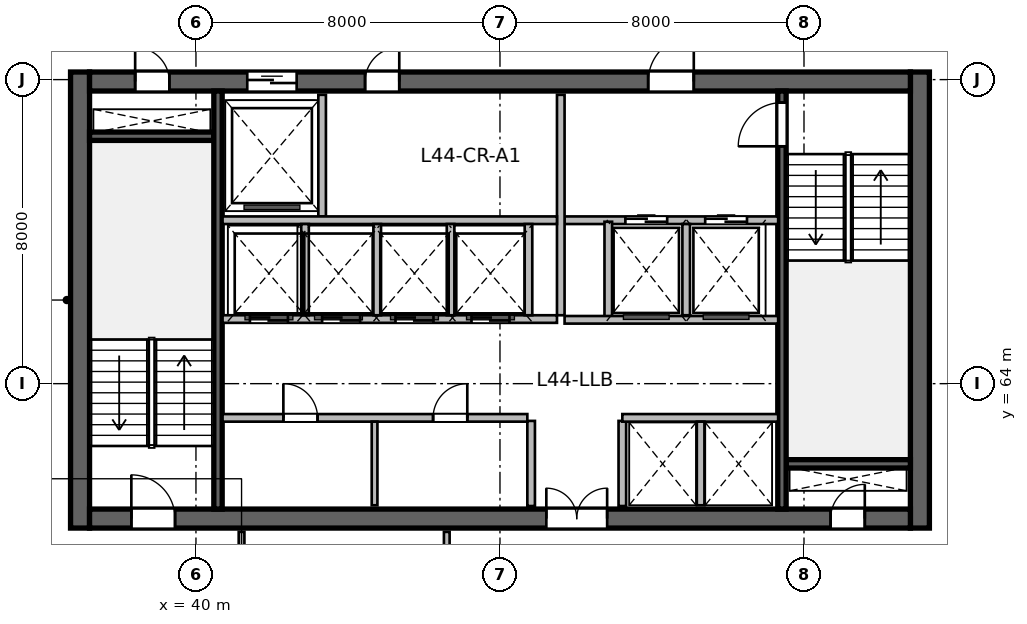
"""IFC4 building model, lengths in metres.
Left out: names, types, materials, properties, quantities, classifications, styles, units other than length and angle.
Written with IfcOpenShell. Run it as: python <this file> out.ifc"""

import sys

from ifc_helpers import new_model, si_unit, direction, frame, frame_2d, origin, place, context, subcontext, project, spatial, rectangle, extrude, source, transform, mapped, element, fill, save


model = new_model("IFC4")
c1 = context("Model", 3, precision=1e-05, world=origin(), true_north=direction((0.0, 1.0)))
c2 = subcontext(c1, "Body", "Model", "MODEL_VIEW")
j1 = project(units=[si_unit("LENGTHUNIT", "METRE"), si_unit("PLANEANGLEUNIT", "RADIAN")], contexts=[c1])
p1 = place(None, origin())
s1 = spatial("IfcSite", under=j1, at=p1, CompositionType="ELEMENT")
p2 = place(p1, origin())
s2 = spatial("IfcBuilding", under=s1, at=p2, CompositionType="ELEMENT")
p3 = place(p2, frame((0.0, 0.0, 181.8)))
s3 = spatial("IfcBuildingStorey", under=s2, at=p3, CompositionType="ELEMENT", Elevation=181.8)
m1 = source(origin(), c2, "Body", "SweptSolid", [
    extrude(rectangle(XDim=12.0, YDim=0.5, at=frame_2d((6.0, 0.0))), origin(), (0.0, 0.0, 1.0), 3.9),
])
for number, where, z_axis, x_axis in (
    (1, (36.95, 60.2, 0.0), (0.0, 0.0, 1.0), (0.0, 1.0, 0.0)),
    (2, (59.05, 60.2, 0.0), (0.0, 0.0, 1.0), (0.0, 1.0, 0.0)),
):
    element("IfcWall", number, at=place(p3, frame(where, z_axis=z_axis, x_axis=x_axis)), inside=s3, PredefinedType="SHEAR", context=c2, shape_type="MappedRepresentation", body=[
        mapped(m1, transform((0.0, 0.0, 0.0), scale=1.0)),
    ])
m2 = source(origin(), c2, "Body", "SweptSolid", [
    extrude(rectangle(XDim=21.6, YDim=0.5, at=frame_2d((10.8, 0.0))), origin(), (0.0, 0.0, 1.0), 3.9),
])
p4 = place(p3, frame((37.2, 60.45, 0.0), z_axis=(0.0, 0.0, 1.0), x_axis=(1.0, 0.0, 0.0)))
e3 = element("IfcWall", 3, at=p4, inside=s3, PredefinedType="SHEAR", context=c2, shape_type="MappedRepresentation", body=[
    mapped(m2, transform((0.0, 0.0, 0.0), scale=1.0)),
])
p5 = place(p4, frame((1.1, 0.0, 0.0)))
e4 = element("IfcOpeningElement", 4, at=p5, cuts=e3, PredefinedType="OPENING", context=c2, shape_type="SweptSolid", body=[
    extrude(rectangle(XDim=1.15, YDim=2.15, at=frame_2d((0.575, 1.075))), frame((0.0, 0.26, 0.0), z_axis=(0.0, -1.0, 0.0), x_axis=(1.0, 0.0, 0.0)), (0.0, 0.0, 1.0), 0.52),
])
p6 = place(p4, frame((19.5, 0.0, 0.0)))
e5 = element("IfcOpeningElement", 5, at=p6, cuts=e3, PredefinedType="OPENING", context=c2, shape_type="SweptSolid", body=[
    extrude(rectangle(XDim=0.9, YDim=2.1, at=frame_2d((0.45, 1.05))), frame((0.0, 0.26, 0.0), z_axis=(0.0, -1.0, 0.0), x_axis=(1.0, 0.0, 0.0)), (0.0, 0.0, 1.0), 0.52),
])
p7 = place(p4, frame((12.02, 0.0, 0.0)))
e6 = element("IfcOpeningElement", 6, at=p7, cuts=e3, PredefinedType="OPENING", context=c2, shape_type="SweptSolid", body=[
    extrude(rectangle(XDim=1.6, YDim=2.15, at=frame_2d((0.8, 1.075))), frame((0.0, 0.26, 0.0), z_axis=(0.0, -1.0, 0.0), x_axis=(1.0, 0.0, 0.0)), (0.0, 0.0, 1.0), 0.52),
])
p8 = place(p3, frame((37.2, 71.95, 0.0), z_axis=(0.0, 0.0, 1.0), x_axis=(1.0, 0.0, 0.0)))
e7 = element("IfcWall", 7, at=p8, inside=s3, PredefinedType="SHEAR", context=c2, shape_type="MappedRepresentation", body=[
    mapped(m2, transform((0.0, 0.0, 0.0), scale=1.0)),
])
p9 = place(p8, frame((1.2, 0.0, 0.0)))
e8 = element("IfcOpeningElement", 8, at=p9, cuts=e7, PredefinedType="OPENING", context=c2, shape_type="SweptSolid", body=[
    extrude(rectangle(XDim=0.9, YDim=2.1, at=frame_2d((0.45, 1.05))), frame((0.0, 0.26, 0.0), z_axis=(0.0, -1.0, 0.0), x_axis=(1.0, 0.0, 0.0)), (0.0, 0.0, 1.0), 0.52),
])
p10 = place(p8, frame((14.7, 0.0, 0.0)))
e9 = element("IfcOpeningElement", 9, at=p10, cuts=e7, PredefinedType="OPENING", context=c2, shape_type="SweptSolid", body=[
    extrude(rectangle(XDim=1.2, YDim=2.15, at=frame_2d((0.6, 1.075))), frame((0.0, 0.26, 0.0), z_axis=(0.0, -1.0, 0.0), x_axis=(1.0, 0.0, 0.0)), (0.0, 0.0, 1.0), 0.52),
])
p11 = place(p8, frame((4.15, 0.0, 0.0)))
e10 = element("IfcOpeningElement", 10, at=p11, cuts=e7, PredefinedType="OPENING", context=c2, shape_type="SweptSolid", body=[
    extrude(rectangle(XDim=1.3, YDim=2.15, at=frame_2d((0.65, 1.075))), frame((0.0, 0.26, 0.0), z_axis=(0.0, -1.0, 0.0), x_axis=(1.0, 0.0, 0.0)), (0.0, 0.0, 1.0), 0.52),
])
p12 = place(p8, frame((7.25, 0.0, 0.0)))
e11 = element("IfcOpeningElement", 11, at=p12, cuts=e7, PredefinedType="OPENING", context=c2, shape_type="SweptSolid", body=[
    extrude(rectangle(XDim=0.9, YDim=2.1, at=frame_2d((0.45, 1.05))), frame((0.0, 0.26, 0.0), z_axis=(0.0, -1.0, 0.0), x_axis=(1.0, 0.0, 0.0)), (0.0, 0.0, 1.0), 0.52),
])
m3 = source(origin(), c2, "Body", "SweptSolid", [
    extrude(rectangle(XDim=3.27, YDim=0.22, at=frame_2d((1.635, 0.0))), origin(), (0.0, 0.0, 1.0), 3.9),
])
for number, where, z_axis, x_axis in (
    (12, (37.2, 70.51, 0.0), (0.0, 0.0, 1.0), (1.0, 0.0, 0.0)),
    (13, (55.53, 61.89, 0.0), (0.0, 0.0, 1.0), (1.0, 0.0, 0.0)),
):
    element("IfcWall", number, at=place(p3, frame(where, z_axis=z_axis, x_axis=x_axis)), inside=s3, PredefinedType="SHEAR", context=c2, shape_type="MappedRepresentation", body=[
        mapped(m3, transform((0.0, 0.0, 0.0), scale=1.0)),
    ])
m4 = source(origin(), c2, "Body", "SweptSolid", [
    extrude(rectangle(XDim=11.0, YDim=0.22, at=frame_2d((5.5, 0.0))), origin(), (0.0, 0.0, 1.0), 3.9),
])
p13 = place(p3, frame((40.58, 60.7, 0.0), z_axis=(0.0, 0.0, 1.0), x_axis=(0.0, 1.0, 0.0)))
e14 = element("IfcWall", 14, at=p13, inside=s3, PredefinedType="SHEAR", context=c2, shape_type="MappedRepresentation", body=[
    mapped(m4, transform((0.0, 0.0, 0.0), scale=1.0)),
])
p14 = place(p3, frame((55.42, 60.7, 0.0), z_axis=(0.0, 0.0, 1.0), x_axis=(0.0, 1.0, 0.0)))
e15 = element("IfcWall", 15, at=p14, inside=s3, PredefinedType="SHEAR", context=c2, shape_type="MappedRepresentation", body=[
    mapped(m4, transform((0.0, 0.0, 0.0), scale=1.0)),
])
p15 = place(p14, frame((9.545, 0.0, 0.0)))
e16 = element("IfcOpeningElement", 16, at=p15, cuts=e15, PredefinedType="OPENING", context=c2, shape_type="SweptSolid", body=[
    extrude(rectangle(XDim=1.15, YDim=2.15, at=frame_2d((0.575, 1.075))), frame((0.0, 0.12, 0.0), z_axis=(0.0, -1.0, 0.0), x_axis=(1.0, 0.0, 0.0)), (0.0, 0.0, 1.0), 0.24),
])
m5 = source(origin(), c2, "Body", "SweptSolid", [
    extrude(rectangle(XDim=2.24, YDim=0.2, at=frame_2d((1.12, 0.0))), origin(), (0.0, 0.0, 1.0), 3.65),
])
for number, where, z_axis, x_axis in (
    (17, (48.82, 60.78, 0.0), (0.0, 0.0, 1.0), (0.0, 1.0, 0.0)),
    (18, (51.22, 60.78, 0.0), (0.0, 0.0, 1.0), (0.0, 1.0, 0.0)),
):
    element("IfcWall", number, at=place(p3, frame(where, z_axis=z_axis, x_axis=x_axis)), inside=s3, PredefinedType="SOLIDWALL", context=c2, shape_type="MappedRepresentation", body=[
        mapped(m5, transform((0.0, 0.0, 0.0), scale=1.0)),
    ])
m6 = source(origin(), c2, "Body", "SweptSolid", [
    extrude(rectangle(XDim=5.62, YDim=0.2, at=frame_2d((2.81, 0.0))), origin(), (0.0, 0.0, 1.0), 3.65),
])
p16 = place(p3, frame((49.7, 68.3, 0.0), z_axis=(0.0, 0.0, 1.0), x_axis=(1.0, 0.0, 0.0)))
e19 = element("IfcWall", 19, at=p16, inside=s3, PredefinedType="SOLIDWALL", context=c2, shape_type="MappedRepresentation", body=[
    mapped(m6, transform((0.0, 0.0, 0.0), scale=1.0)),
])
p17 = place(p16, frame((1.6, 0.0, 0.0)))
e20 = element("IfcOpeningElement", 20, at=p17, cuts=e19, PredefinedType="OPENING", context=c2, shape_type="SweptSolid", body=[
    extrude(rectangle(XDim=1.1, YDim=2.15, at=frame_2d((0.55, 1.075))), frame((0.0, 0.11, 0.0), z_axis=(0.0, -1.0, 0.0), x_axis=(1.0, 0.0, 0.0)), (0.0, 0.0, 1.0), 0.22),
])
p18 = place(p16, frame((3.7, 0.0, 0.0)))
e21 = element("IfcOpeningElement", 21, at=p18, cuts=e19, PredefinedType="OPENING", context=c2, shape_type="SweptSolid", body=[
    extrude(rectangle(XDim=1.1, YDim=2.15, at=frame_2d((0.55, 1.075))), frame((0.0, 0.11, 0.0), z_axis=(0.0, -1.0, 0.0), x_axis=(1.0, 0.0, 0.0)), (0.0, 0.0, 1.0), 0.22),
])
m7 = source(origin(), c2, "Body", "SweptSolid", [
    extrude(rectangle(XDim=5.8, YDim=0.2, at=frame_2d((2.9, 0.0))), origin(), (0.0, 0.0, 1.0), 3.65),
])
p19 = place(p3, frame((49.6, 65.8, 0.0), z_axis=(0.0, 0.0, 1.0), x_axis=(0.0, 1.0, 0.0)))
e22 = element("IfcWall", 22, at=p19, inside=s3, PredefinedType="SOLIDWALL", context=c2, shape_type="MappedRepresentation", body=[
    mapped(m7, transform((0.0, 0.0, 0.0), scale=1.0)),
])
m8 = source(origin(), c2, "Body", "SweptSolid", [
    extrude(rectangle(XDim=2.58, YDim=0.2, at=frame_2d((1.29, 0.0))), origin(), (0.0, 0.0, 1.0), 3.65),
])
p20 = place(p3, frame((50.85, 65.68, 0.0), z_axis=(0.0, 0.0, 1.0), x_axis=(0.0, 1.0, 0.0)))
e23 = element("IfcWall", 23, at=p20, inside=s3, PredefinedType="SOLIDWALL", context=c2, shape_type="MappedRepresentation", body=[
    mapped(m8, transform((0.0, 0.0, 0.0), scale=1.0)),
])
m9 = source(origin(), c2, "Body", "SweptSolid", [
    extrude(rectangle(XDim=2.4, YDim=0.2, at=frame_2d((1.2, 0.0))), origin(), (0.0, 0.0, 1.0), 3.65),
])
p21 = place(p3, frame((52.9, 65.8, 0.0), z_axis=(0.0, 0.0, 1.0), x_axis=(0.0, 1.0, 0.0)))
e24 = element("IfcWall", 24, at=p21, inside=s3, PredefinedType="SOLIDWALL", context=c2, shape_type="MappedRepresentation", body=[
    mapped(m9, transform((0.0, 0.0, 0.0), scale=1.0)),
])
p22 = place(p3, frame((49.7, 65.68, 0.0), z_axis=(0.0, 0.0, 1.0), x_axis=(1.0, 0.0, 0.0)))
e25 = element("IfcWall", 25, at=p22, inside=s3, PredefinedType="SOLIDWALL", context=c2, shape_type="MappedRepresentation", body=[
    mapped(m6, transform((0.0, 0.0, 0.0), scale=1.0)),
])
m10 = source(origin(), c2, "Body", "SweptSolid", [
    extrude(rectangle(XDim=3.2, YDim=0.2, at=frame_2d((1.6, 0.0))), origin(), (0.0, 0.0, 1.0), 3.65),
])
p23 = place(p3, frame((43.32, 68.4, 0.0), z_axis=(0.0, 0.0, 1.0), x_axis=(0.0, 1.0, 0.0)))
e26 = element("IfcWall", 26, at=p23, inside=s3, PredefinedType="SOLIDWALL", context=c2, shape_type="MappedRepresentation", body=[
    mapped(m10, transform((0.0, 0.0, 0.0), scale=1.0)),
])
m11 = source(origin(), c2, "Body", "SweptSolid", [
    extrude(rectangle(XDim=8.8, YDim=0.2, at=frame_2d((4.4, 0.0))), origin(), (0.0, 0.0, 1.0), 3.65),
])
p24 = place(p3, frame((40.7, 68.3, 0.0), z_axis=(0.0, 0.0, 1.0), x_axis=(1.0, 0.0, 0.0)))
e27 = element("IfcWall", 27, at=p24, inside=s3, PredefinedType="SOLIDWALL", context=c2, shape_type="MappedRepresentation", body=[
    mapped(m11, transform((0.0, 0.0, 0.0), scale=1.0)),
])
m12 = source(origin(), c2, "Body", "SweptSolid", [
    extrude(rectangle(XDim=8.02, YDim=0.2, at=frame_2d((4.01, 0.0))), origin(), (0.0, 0.0, 1.0), 3.65),
])
p25 = place(p3, frame((40.7, 63.1, 0.0), z_axis=(0.0, 0.0, 1.0), x_axis=(1.0, 0.0, 0.0)))
e28 = element("IfcWall", 28, at=p25, inside=s3, PredefinedType="SOLIDWALL", context=c2, shape_type="MappedRepresentation", body=[
    mapped(m12, transform((0.0, 0.0, 0.0), scale=1.0)),
])
p26 = place(p25, frame((1.6, 0.0, 0.0)))
e29 = element("IfcOpeningElement", 29, at=p26, cuts=e28, PredefinedType="OPENING", context=c2, shape_type="SweptSolid", body=[
    extrude(rectangle(XDim=0.9, YDim=2.1, at=frame_2d((0.45, 1.05))), frame((0.0, 0.11, 0.0), z_axis=(0.0, -1.0, 0.0), x_axis=(1.0, 0.0, 0.0)), (0.0, 0.0, 1.0), 0.22),
])
p27 = place(p25, frame((5.54, 0.0, 0.0)))
e30 = element("IfcOpeningElement", 30, at=p27, cuts=e28, PredefinedType="OPENING", context=c2, shape_type="SweptSolid", body=[
    extrude(rectangle(XDim=0.9, YDim=2.1, at=frame_2d((0.45, 1.05))), frame((0.0, 0.11, 0.0), z_axis=(0.0, -1.0, 0.0), x_axis=(1.0, 0.0, 0.0)), (0.0, 0.0, 1.0), 0.22),
])
m13 = source(origin(), c2, "Body", "SweptSolid", [
    extrude(rectangle(XDim=4.1, YDim=0.2, at=frame_2d((2.05, 0.0))), origin(), (0.0, 0.0, 1.0), 3.65),
])
p28 = place(p3, frame((51.22, 63.1, 0.0), z_axis=(0.0, 0.0, 1.0), x_axis=(1.0, 0.0, 0.0)))
e31 = element("IfcWall", 31, at=p28, inside=s3, PredefinedType="SOLIDWALL", context=c2, shape_type="MappedRepresentation", body=[
    mapped(m13, transform((0.0, 0.0, 0.0), scale=1.0)),
])
m14 = source(origin(), c2, "Body", "SweptSolid", [
    extrude(rectangle(XDim=2.2, YDim=0.15, at=frame_2d((1.1, 0.0))), origin(), (0.0, 0.0, 1.0), 3.65),
])
p29 = place(p3, frame((44.7, 60.8, 0.0), z_axis=(0.0, 0.0, 1.0), x_axis=(0.0, 1.0, 0.0)))
e32 = element("IfcWall", 32, at=p29, inside=s3, PredefinedType="PARTITIONING", context=c2, shape_type="MappedRepresentation", body=[
    mapped(m14, transform((0.0, 0.0, 0.0), scale=1.0)),
])
m15 = source(origin(), c2, "Body", "SweptSolid", [
    extrude(rectangle(XDim=2.2, YDim=0.2, at=frame_2d((1.1, 0.0))), origin(), (0.0, 0.0, 1.0), 3.65),
])
p30 = place(p3, frame((53.28, 60.8, 0.0), z_axis=(0.0, 0.0, 1.0), x_axis=(0.0, 1.0, 0.0)))
e33 = element("IfcWall", 33, at=p30, inside=s3, PredefinedType="SOLIDWALL", context=c2, shape_type="MappedRepresentation", body=[
    mapped(m15, transform((0.0, 0.0, 0.0), scale=1.0)),
])
p31 = place(p3, frame((40.7, 65.7, 0.0), z_axis=(0.0, 0.0, 1.0), x_axis=(1.0, 0.0, 0.0)))
e34 = element("IfcWall", 34, at=p31, inside=s3, PredefinedType="SOLIDWALL", context=c2, shape_type="MappedRepresentation", body=[
    mapped(m11, transform((0.0, 0.0, 0.0), scale=1.0)),
])
p32 = place(p31, frame((0.72, 0.0, 0.0)))
e35 = element("IfcOpeningElement", 35, at=p32, cuts=e34, PredefinedType="OPENING", context=c2, shape_type="SweptSolid", body=[
    extrude(rectangle(XDim=1.0, YDim=2.15, at=frame_2d((0.5, 1.075))), frame((0.0, 0.11, 0.0), z_axis=(0.0, -1.0, 0.0), x_axis=(1.0, 0.0, 0.0)), (0.0, 0.0, 1.0), 0.22),
])
p33 = place(p31, frame((2.62, 0.0, 0.0)))
e36 = element("IfcOpeningElement", 36, at=p33, cuts=e34, PredefinedType="OPENING", context=c2, shape_type="SweptSolid", body=[
    extrude(rectangle(XDim=1.0, YDim=2.15, at=frame_2d((0.5, 1.075))), frame((0.0, 0.11, 0.0), z_axis=(0.0, -1.0, 0.0), x_axis=(1.0, 0.0, 0.0)), (0.0, 0.0, 1.0), 0.22),
])
p34 = place(p31, frame((4.55, 0.0, 0.0)))
e37 = element("IfcOpeningElement", 37, at=p34, cuts=e34, PredefinedType="OPENING", context=c2, shape_type="SweptSolid", body=[
    extrude(rectangle(XDim=1.0, YDim=2.15, at=frame_2d((0.5, 1.075))), frame((0.0, 0.11, 0.0), z_axis=(0.0, -1.0, 0.0), x_axis=(1.0, 0.0, 0.0)), (0.0, 0.0, 1.0), 0.22),
])
p35 = place(p31, frame((6.55, 0.0, 0.0)))
e38 = element("IfcOpeningElement", 38, at=p35, cuts=e34, PredefinedType="OPENING", context=c2, shape_type="SweptSolid", body=[
    extrude(rectangle(XDim=1.0, YDim=2.15, at=frame_2d((0.5, 1.075))), frame((0.0, 0.11, 0.0), z_axis=(0.0, -1.0, 0.0), x_axis=(1.0, 0.0, 0.0)), (0.0, 0.0, 1.0), 0.22),
])
for number, where, z_axis, x_axis in (
    (39, (48.75, 65.8, 0.0), (0.0, 0.0, 1.0), (0.0, 1.0, 0.0)),
    (40, (42.87, 65.8, 0.0), (0.0, 0.0, 1.0), (0.0, 1.0, 0.0)),
    (41, (44.77, 65.8, 0.0), (0.0, 0.0, 1.0), (0.0, 1.0, 0.0)),
    (42, (46.7, 65.8, 0.0), (0.0, 0.0, 1.0), (0.0, 1.0, 0.0)),
):
    element("IfcWall", number, at=place(p3, frame(where, z_axis=z_axis, x_axis=x_axis)), inside=s3, PredefinedType="SOLIDWALL", context=c2, shape_type="MappedRepresentation", body=[
        mapped(m9, transform((0.0, 0.0, 0.0), scale=1.0)),
    ])
m16 = source(origin(), c2, "Body", "SweptSolid", [
    extrude(rectangle(XDim=2.033, YDim=0.15, at=frame_2d((1.016, 0.0))), origin(), (0.0, 0.0, 1.0), 3.65),
])
p36 = place(p3, frame((41.2, 58.067, 0.0), z_axis=(0.0, 0.0, 1.0), x_axis=(0.0, 1.0, 0.0)))
e43 = element("IfcWall", 43, at=p36, inside=s3, PredefinedType="PARTITIONING", context=c2, shape_type="MappedRepresentation", body=[
    mapped(m16, transform((0.0, 0.0, 0.0), scale=1.0)),
])
p37 = place(p36, frame((0.591, 0.0, 0.0)))
e44 = element("IfcOpeningElement", 44, at=p37, cuts=e43, PredefinedType="OPENING", context=c2, shape_type="SweptSolid", body=[
    extrude(rectangle(XDim=0.85, YDim=2.1, at=frame_2d((0.425, 1.05))), frame((0.0, 0.085, 0.0), z_axis=(0.0, -1.0, 0.0), x_axis=(1.0, 0.0, 0.0)), (0.0, 0.0, 1.0), 0.17),
])
p38 = place(p3, frame((46.6, 58.067, 0.0), z_axis=(0.0, 0.0, 1.0), x_axis=(0.0, 1.0, 0.0)))
e45 = element("IfcWall", 45, at=p38, inside=s3, PredefinedType="PARTITIONING", context=c2, shape_type="MappedRepresentation", body=[
    mapped(m16, transform((0.0, 0.0, 0.0), scale=1.0)),
])
m17 = source(origin(), c2, "Body", "SweptSolid", [
    extrude(rectangle(XDim=1.15, YDim=2.15, at=frame_2d((0.575, 1.075))), frame((0.0, 0.025, 0.0), z_axis=(0.0, -1.0, 0.0), x_axis=(1.0, 0.0, 0.0)), (0.0, 0.0, 1.0), 0.05),
])
p39 = place(p5, origin())
e46 = element("IfcDoor", 46, at=p39, inside=s3, OperationType="SINGLE_SWING_LEFT", PredefinedType="DOOR", context=c2, shape_type="MappedRepresentation", body=[
    mapped(m17, transform((0.0, 0.0, 0.0), scale=1.0)),
])
fill(e4, e46)
m18 = source(origin(), c2, "Body", "SweptSolid", [
    extrude(rectangle(XDim=0.9, YDim=2.1, at=frame_2d((0.45, 1.05))), frame((0.0, 0.025, 0.0), z_axis=(0.0, -1.0, 0.0), x_axis=(1.0, 0.0, 0.0)), (0.0, 0.0, 1.0), 0.05),
])
p40 = place(p9, origin())
e47 = element("IfcDoor", 47, at=p40, inside=s3, OperationType="SINGLE_SWING_LEFT", PredefinedType="DOOR", context=c2, shape_type="MappedRepresentation", body=[
    mapped(m18, transform((0.0, 0.0, 0.0), scale=1.0)),
])
fill(e8, e47)
p41 = place(p6, origin())
e48 = element("IfcDoor", 48, at=p41, inside=s3, OperationType="SINGLE_SWING_RIGHT", PredefinedType="DOOR", context=c2, shape_type="MappedRepresentation", body=[
    mapped(m18, transform((0.0, 0.0, 0.0), scale=1.0)),
])
fill(e5, e48)
p42 = place(p15, origin())
e49 = element("IfcDoor", 49, at=p42, inside=s3, OperationType="SINGLE_SWING_LEFT", PredefinedType="DOOR", context=c2, shape_type="MappedRepresentation", body=[
    mapped(m17, transform((0.0, 0.0, 0.0), scale=1.0)),
])
fill(e16, e49)
m19 = source(origin(), c2, "Body", "SweptSolid", [
    extrude(rectangle(XDim=1.6, YDim=2.15, at=frame_2d((0.8, 1.075))), frame((0.0, 0.025, 0.0), z_axis=(0.0, -1.0, 0.0), x_axis=(1.0, 0.0, 0.0)), (0.0, 0.0, 1.0), 0.05),
])
p43 = place(p7, origin())
e50 = element("IfcDoor", 50, at=p43, inside=s3, OperationType="DOUBLE_DOOR_SINGLE_SWING", PredefinedType="DOOR", context=c2, shape_type="MappedRepresentation", body=[
    mapped(m19, transform((0.0, 0.0, 0.0), scale=1.0)),
])
fill(e6, e50)
m20 = source(origin(), c2, "Body", "SweptSolid", [
    extrude(rectangle(XDim=1.2, YDim=2.15, at=frame_2d((0.6, 1.075))), frame((0.0, 0.025, 0.0), z_axis=(0.0, -1.0, 0.0), x_axis=(1.0, 0.0, 0.0)), (0.0, 0.0, 1.0), 0.05),
])
p44 = place(p10, origin())
e51 = element("IfcDoor", 51, at=p44, inside=s3, OperationType="SINGLE_SWING_RIGHT", PredefinedType="DOOR", context=c2, shape_type="MappedRepresentation", body=[
    mapped(m20, transform((0.0, 0.0, 0.0), scale=1.0)),
])
fill(e9, e51)
m21 = source(origin(), c2, "Body", "SweptSolid", [
    extrude(rectangle(XDim=1.1, YDim=2.15, at=frame_2d((0.55, 1.075))), frame((0.0, 0.025, 0.0), z_axis=(0.0, -1.0, 0.0), x_axis=(1.0, 0.0, 0.0)), (0.0, 0.0, 1.0), 0.05),
])
p45 = place(p17, origin())
e52 = element("IfcDoor", 52, at=p45, inside=s3, OperationType="DOUBLE_DOOR_SLIDING", PredefinedType="DOOR", context=c2, shape_type="MappedRepresentation", body=[
    mapped(m21, transform((0.0, 0.0, 0.0), scale=1.0)),
])
fill(e20, e52)
p46 = place(p18, origin())
e53 = element("IfcDoor", 53, at=p46, inside=s3, OperationType="DOUBLE_DOOR_SLIDING", PredefinedType="DOOR", context=c2, shape_type="MappedRepresentation", body=[
    mapped(m21, transform((0.0, 0.0, 0.0), scale=1.0)),
])
fill(e21, e53)
m22 = source(origin(), c2, "Body", "SweptSolid", [
    extrude(rectangle(XDim=1.3, YDim=2.15, at=frame_2d((0.65, 1.075))), frame((0.0, 0.025, 0.0), z_axis=(0.0, -1.0, 0.0), x_axis=(1.0, 0.0, 0.0)), (0.0, 0.0, 1.0), 0.05),
])
p47 = place(p11, origin())
e54 = element("IfcDoor", 54, at=p47, inside=s3, OperationType="DOUBLE_DOOR_SLIDING", PredefinedType="DOOR", context=c2, shape_type="MappedRepresentation", body=[
    mapped(m22, transform((0.0, 0.0, 0.0), scale=1.0)),
])
fill(e10, e54)
p48 = place(p12, origin())
e55 = element("IfcDoor", 55, at=p48, inside=s3, OperationType="SINGLE_SWING_RIGHT", PredefinedType="DOOR", context=c2, shape_type="MappedRepresentation", body=[
    mapped(m18, transform((0.0, 0.0, 0.0), scale=1.0)),
])
fill(e11, e55)
p49 = place(p26, origin())
e56 = element("IfcDoor", 56, at=p49, inside=s3, OperationType="SINGLE_SWING_LEFT", PredefinedType="DOOR", context=c2, shape_type="MappedRepresentation", body=[
    mapped(m18, transform((0.0, 0.0, 0.0), scale=1.0)),
])
fill(e29, e56)
p50 = place(p27, origin())
e57 = element("IfcDoor", 57, at=p50, inside=s3, OperationType="SINGLE_SWING_RIGHT", PredefinedType="DOOR", context=c2, shape_type="MappedRepresentation", body=[
    mapped(m18, transform((0.0, 0.0, 0.0), scale=1.0)),
])
fill(e30, e57)
m23 = source(origin(), c2, "Body", "SweptSolid", [
    extrude(rectangle(XDim=1.0, YDim=2.15, at=frame_2d((0.5, 1.075))), frame((0.0, 0.025, 0.0), z_axis=(0.0, -1.0, 0.0), x_axis=(1.0, 0.0, 0.0)), (0.0, 0.0, 1.0), 0.05),
])
p51 = place(p32, origin())
e58 = element("IfcDoor", 58, at=p51, inside=s3, OperationType="DOUBLE_DOOR_SLIDING", PredefinedType="DOOR", context=c2, shape_type="MappedRepresentation", body=[
    mapped(m23, transform((0.0, 0.0, 0.0), scale=1.0)),
])
fill(e35, e58)
p52 = place(p33, origin())
e59 = element("IfcDoor", 59, at=p52, inside=s3, OperationType="DOUBLE_DOOR_SLIDING", PredefinedType="DOOR", context=c2, shape_type="MappedRepresentation", body=[
    mapped(m23, transform((0.0, 0.0, 0.0), scale=1.0)),
])
fill(e36, e59)
p53 = place(p34, origin())
e60 = element("IfcDoor", 60, at=p53, inside=s3, OperationType="DOUBLE_DOOR_SLIDING", PredefinedType="DOOR", context=c2, shape_type="MappedRepresentation", body=[
    mapped(m23, transform((0.0, 0.0, 0.0), scale=1.0)),
])
fill(e37, e60)
p54 = place(p35, origin())
e61 = element("IfcDoor", 61, at=p54, inside=s3, OperationType="DOUBLE_DOOR_SLIDING", PredefinedType="DOOR", context=c2, shape_type="MappedRepresentation", body=[
    mapped(m23, transform((0.0, 0.0, 0.0), scale=1.0)),
])
fill(e38, e61)
save(model, sys.argv[1])
